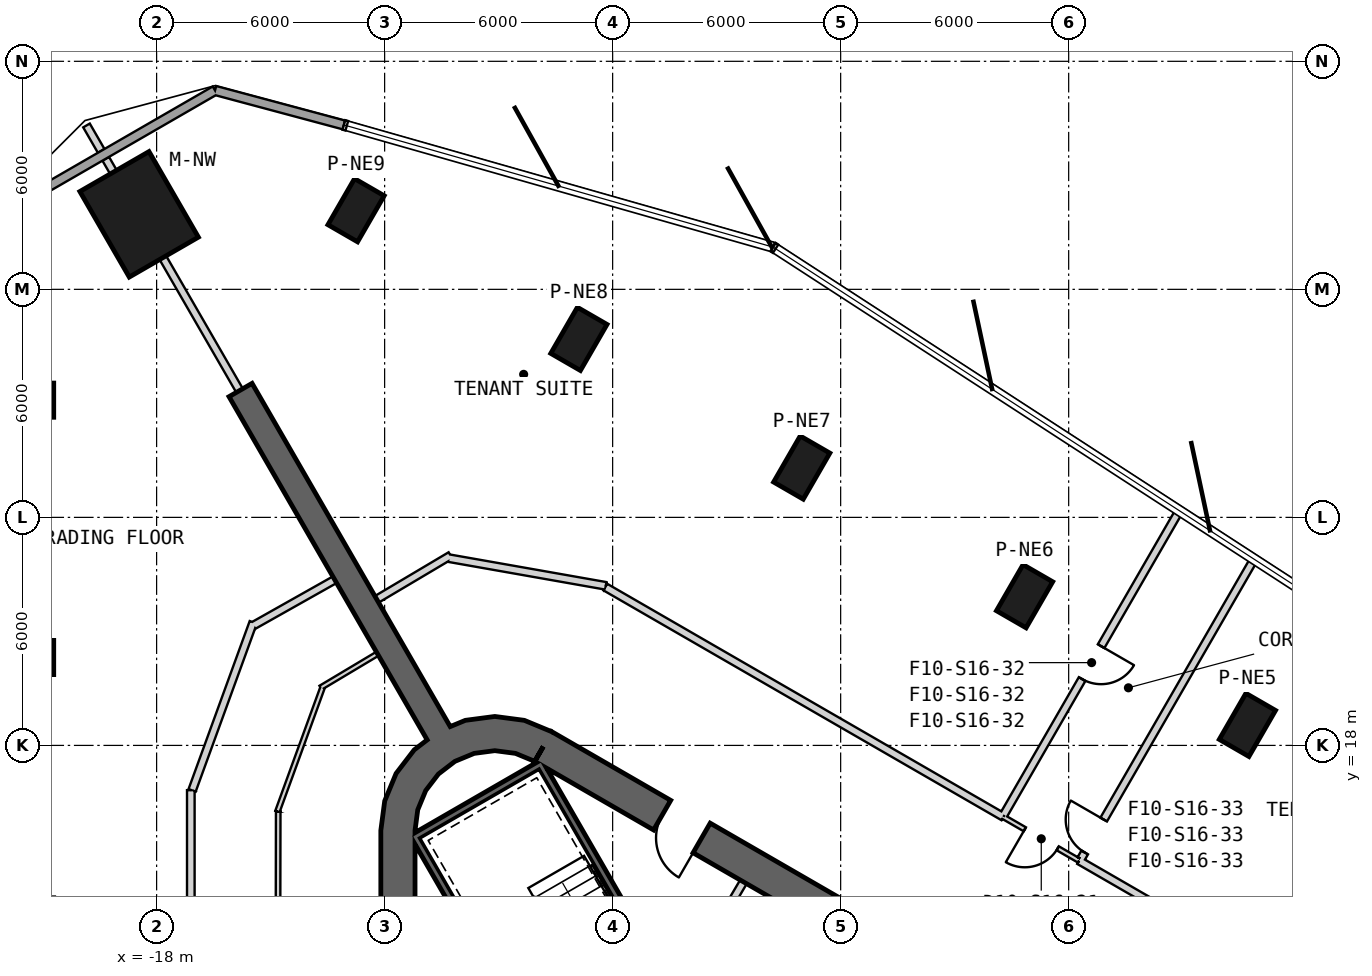
"""IFC4 building model, lengths in metres.
Left out: names, types, materials, properties, quantities, classifications, styles, units other than length and angle.
Written with IfcOpenShell. Run it as: python <this file> out.ifc"""

import sys

from ifc_helpers import new_model, si_unit, direction, frame, frame_2d, origin, origin_2d, place, context, subcontext, project, spatial, polyline, rectangle, outline, extrude, element, fill, save


model = new_model("IFC4")
c1 = context("Model", 3, precision=1e-05, world=origin(), true_north=direction((0.0, 1.0)))
c2 = subcontext(c1, "Body", "Model", "MODEL_VIEW")
j1 = project(units=[si_unit("LENGTHUNIT", "METRE"), si_unit("PLANEANGLEUNIT", "RADIAN")], contexts=[c1])
p1 = place(None, origin())
s1 = spatial("IfcSite", under=j1, at=p1, CompositionType="ELEMENT")
p2 = place(p1, origin())
s2 = spatial("IfcBuilding", under=s1, at=p2, CompositionType="ELEMENT")
p3 = place(p2, frame((0.0, 0.0, 253.2)))
s3 = spatial("IfcBuildingStorey", under=s2, at=p3, CompositionType="ELEMENT", Elevation=253.2)
p4 = place(p3, frame((-18.46, 31.974, 0.0), z_axis=(0.0, 0.0, 1.0), x_axis=(-0.5, 0.866025403784, 0.0)))
e1 = element("IfcColumn", 1, at=p4, inside=s3, PredefinedType="COLUMN", context=c2, shape_type="SweptSolid", body=[
    extrude(rectangle(XDim=2.6, YDim=2.1, at=origin_2d()), origin(), (0.0, 0.0, 1.0), 4.0),
])
for number, where, z_axis, x_axis in (
    (2, (-21.407, 27.084, 0.0), (0.0, 0.0, 1.0), (-1.0, 0.0, 0.0)),
    (3, (-21.407, 20.313, 0.0), (0.0, 0.0, 1.0), (-1.0, 0.0, 0.0)),
    (4, (10.704, 18.539, 0.0), (0.0, 0.0, 1.0), (0.5, 0.866, 0.0)),
    (5, (4.84, 21.925, 0.0), (0.0, 0.0, 1.0), (0.5, 0.866, 0.0)),
    (6, (-1.024, 25.31, 0.0), (0.0, 0.0, 1.0), (0.5, 0.866, 0.0)),
    (7, (-6.888, 28.696, 0.0), (0.0, 0.0, 1.0), (0.5, 0.866, 0.0)),
    (8, (-12.752, 32.081, 0.0), (0.0, 0.0, 1.0), (0.5, 0.866, 0.0)),
):
    element("IfcColumn", number, at=place(p3, frame(where, z_axis=z_axis, x_axis=x_axis)), inside=s3, PredefinedType="COLUMN", context=c2, shape_type="SweptSolid", body=[
        extrude(rectangle(XDim=1.4, YDim=0.9, at=origin_2d()), origin(), (0.0, 0.0, 1.0), 4.0),
    ])
p5 = place(p3, frame((19.475, 2.208, 0.0), z_axis=(0.0, 0.0, 1.0), x_axis=(-0.866028369851, 0.499994862586, 0.0)))
e9 = element("IfcWall", 9, at=p5, inside=s3, PredefinedType="SHEAR", context=c2, shape_type="SweptSolid", body=[
    extrude(rectangle(XDim=31.523, YDim=0.9, at=frame_2d((15.762, 0.0))), origin(), (0.0, 0.0, 1.0), 4.0),
])
p6 = place(p5, frame((7.062, 0.0, 0.0)))
e10 = element("IfcOpeningElement", 10, at=p6, cuts=e9, PredefinedType="OPENING", context=c2, shape_type="SweptSolid", body=[
    extrude(rectangle(XDim=1.2, YDim=2.4, at=frame_2d((0.6, 1.2))), frame((0.0, 0.46, 0.0), z_axis=(0.0, -1.0, 0.0), x_axis=(1.0, 0.0, 0.0)), (0.0, 0.0, 1.0), 0.92),
])
p7 = place(p5, frame((3.612, 0.0, 0.0)))
e11 = element("IfcOpeningElement", 11, at=p7, cuts=e9, PredefinedType="OPENING", context=c2, shape_type="SweptSolid", body=[
    extrude(rectangle(XDim=1.2, YDim=2.4, at=frame_2d((0.6, 1.2))), frame((0.0, 0.46, 0.0), z_axis=(0.0, -1.0, 0.0), x_axis=(1.0, 0.0, 0.0)), (0.0, 0.0, 1.0), 0.92),
])
p8 = place(p5, frame((26.712, 0.0, 0.0)))
e12 = element("IfcOpeningElement", 12, at=p8, cuts=e9, PredefinedType="OPENING", context=c2, shape_type="SweptSolid", body=[
    extrude(rectangle(XDim=1.2, YDim=2.4, at=frame_2d((0.6, 1.2))), frame((0.0, 0.46, 0.0), z_axis=(0.0, -1.0, 0.0), x_axis=(1.0, 0.0, 0.0)), (0.0, 0.0, 1.0), 0.92),
])
p9 = place(p3, frame((-11.65, 15.762, 0.0), z_axis=(0.0, 0.0, 1.0), x_axis=(0.0, -1.0, 0.0)))
e13 = element("IfcWall", 13, at=p9, inside=s3, PredefinedType="SHEAR", context=c2, shape_type="SweptSolid", body=[
    extrude(rectangle(XDim=31.523, YDim=0.9, at=frame_2d((15.762, 0.0))), origin(), (0.0, 0.0, 1.0), 4.0),
])
p10 = place(p9, frame((7.062, 0.0, 0.0)))
e14 = element("IfcOpeningElement", 14, at=p10, cuts=e13, PredefinedType="OPENING", context=c2, shape_type="SweptSolid", body=[
    extrude(rectangle(XDim=1.2, YDim=2.4, at=frame_2d((0.6, 1.2))), frame((0.0, 0.46, 0.0), z_axis=(0.0, -1.0, 0.0), x_axis=(1.0, 0.0, 0.0)), (0.0, 0.0, 1.0), 0.92),
])
p11 = place(p9, frame((9.762, 0.0, 0.0)))
e15 = element("IfcOpeningElement", 15, at=p11, cuts=e13, PredefinedType="OPENING", context=c2, shape_type="SweptSolid", body=[
    extrude(rectangle(XDim=1.2, YDim=2.4, at=frame_2d((0.6, 1.2))), frame((0.0, 0.46, 0.0), z_axis=(0.0, -1.0, 0.0), x_axis=(1.0, 0.0, 0.0)), (0.0, 0.0, 1.0), 0.92),
])
p12 = place(p9, frame((12.462, 0.0, 0.0)))
e16 = element("IfcOpeningElement", 16, at=p12, cuts=e13, PredefinedType="OPENING", context=c2, shape_type="SweptSolid", body=[
    extrude(rectangle(XDim=1.2, YDim=2.4, at=frame_2d((0.6, 1.2))), frame((0.0, 0.46, 0.0), z_axis=(0.0, -1.0, 0.0), x_axis=(1.0, 0.0, 0.0)), (0.0, 0.0, 1.0), 0.92),
])
p13 = place(p9, frame((15.162, 0.0, 0.0)))
e17 = element("IfcOpeningElement", 17, at=p13, cuts=e13, PredefinedType="OPENING", context=c2, shape_type="SweptSolid", body=[
    extrude(rectangle(XDim=1.2, YDim=2.4, at=frame_2d((0.6, 1.2))), frame((0.0, 0.46, 0.0), z_axis=(0.0, -1.0, 0.0), x_axis=(1.0, 0.0, 0.0)), (0.0, 0.0, 1.0), 0.92),
])
p14 = place(p9, frame((17.862, 0.0, 0.0)))
e18 = element("IfcOpeningElement", 18, at=p14, cuts=e13, PredefinedType="OPENING", context=c2, shape_type="SweptSolid", body=[
    extrude(rectangle(XDim=1.2, YDim=2.4, at=frame_2d((0.6, 1.2))), frame((0.0, 0.46, 0.0), z_axis=(0.0, -1.0, 0.0), x_axis=(1.0, 0.0, 0.0)), (0.0, 0.0, 1.0), 0.92),
])
p15 = place(p9, frame((20.562, 0.0, 0.0)))
e19 = element("IfcOpeningElement", 19, at=p15, cuts=e13, PredefinedType="OPENING", context=c2, shape_type="SweptSolid", body=[
    extrude(rectangle(XDim=1.2, YDim=2.4, at=frame_2d((0.6, 1.2))), frame((0.0, 0.46, 0.0), z_axis=(0.0, -1.0, 0.0), x_axis=(1.0, 0.0, 0.0)), (0.0, 0.0, 1.0), 0.92),
])
p16 = place(p9, frame((23.262, 0.0, 0.0)))
e20 = element("IfcOpeningElement", 20, at=p16, cuts=e13, PredefinedType="OPENING", context=c2, shape_type="SweptSolid", body=[
    extrude(rectangle(XDim=1.2, YDim=2.4, at=frame_2d((0.6, 1.2))), frame((0.0, 0.46, 0.0), z_axis=(0.0, -1.0, 0.0), x_axis=(1.0, 0.0, 0.0)), (0.0, 0.0, 1.0), 0.92),
])
p17 = place(p9, frame((3.612, 0.0, 0.0)))
e21 = element("IfcOpeningElement", 21, at=p17, cuts=e13, PredefinedType="OPENING", context=c2, shape_type="SweptSolid", body=[
    extrude(rectangle(XDim=1.2, YDim=2.4, at=frame_2d((0.6, 1.2))), frame((0.0, 0.46, 0.0), z_axis=(0.0, -1.0, 0.0), x_axis=(1.0, 0.0, 0.0)), (0.0, 0.0, 1.0), 0.92),
])
p18 = place(p9, frame((26.712, 0.0, 0.0)))
e22 = element("IfcOpeningElement", 22, at=p18, cuts=e13, PredefinedType="OPENING", context=c2, shape_type="SweptSolid", body=[
    extrude(rectangle(XDim=1.2, YDim=2.4, at=frame_2d((0.6, 1.2))), frame((0.0, 0.46, 0.0), z_axis=(0.0, -1.0, 0.0), x_axis=(1.0, 0.0, 0.0)), (0.0, 0.0, 1.0), 0.92),
])
p19 = place(p3, origin())
e23 = element("IfcWall", 23, at=p19, inside=s3, PredefinedType="SHEAR", context=c2, shape_type="SweptSolid", body=[
    extrude(outline(polyline([(-7.6, 18.36), (-8.323, 18.659), (-9.1, 18.762), (-9.876, 18.659), (-10.6, 18.36), (-11.221, 17.883), (-11.698, 17.262), (-11.998, 16.538), (-12.1, 15.762), (-11.2, 15.762), (-11.128, 16.305), (-10.919, 16.812), (-10.585, 17.247), (-10.15, 17.58), (-9.644, 17.79), (-9.1, 17.862), (-8.556, 17.79), (-8.05, 17.58), (-7.6, 18.36)])), origin(), (0.0, 0.0, 1.0), 4.0),
])
p20 = place(p3, frame((-10.575, 18.316, 0.0), z_axis=(0.0, 0.0, 1.0), x_axis=(-0.500010108608, 0.866019567498, 0.0)))
e24 = element("IfcWall", 24, at=p20, inside=s3, PredefinedType="SHEAR", context=c2, shape_type="SweptSolid", body=[
    extrude(rectangle(XDim=10.432, YDim=0.7, at=frame_2d((5.216, 0.0))), origin(), (0.0, 0.0, 1.0), 4.0),
])
p21 = place(p3, frame((-13.072, 34.326, 0.0), z_axis=(0.0, 0.0, 1.0), x_axis=(-0.965926007748, 0.258818367886, 0.0)))
e25 = element("IfcWall", 25, at=p21, inside=s3, PredefinedType="SOLIDWALL", context=c2, shape_type="SweptSolid", body=[
    extrude(rectangle(XDim=3.51, YDim=0.24, at=frame_2d((1.755, 0.0))), origin(), (0.0, 0.0, 1.0), 3.7),
])
p22 = place(p3, frame((-16.463, 35.235, 0.0), z_axis=(0.0, 0.0, 1.0), x_axis=(-0.86603253074, -0.499987655547, 0.0)))
e26 = element("IfcWall", 26, at=p22, inside=s3, PredefinedType="SOLIDWALL", context=c2, shape_type="SweptSolid", body=[
    extrude(rectangle(XDim=6.72, YDim=0.24, at=frame_2d((3.36, 0.0))), origin(), (0.0, 0.0, 1.0), 3.7),
])
p23 = place(p3, frame((-11.245, 15.678, -0.3), z_axis=(0.0, 0.0, 1.0), x_axis=(0.499977274689, -0.866038523851, 0.0)))
e27 = element("IfcWall", 27, at=p23, inside=s3, PredefinedType="SHEAR", context=c2, shape_type="SweptSolid", body=[
    extrude(rectangle(XDim=8.1, YDim=0.2, at=frame_2d((4.05, 0.0))), origin(), (0.0, 0.0, 1.0), 4.0),
])
p24 = place(p3, frame((-7.818, 17.541, -0.3), z_axis=(0.0, 0.0, 1.0), x_axis=(-0.866044365799, -0.499967155389, 0.0)))
e28 = element("IfcWall", 28, at=p24, inside=s3, PredefinedType="SHEAR", context=c2, shape_type="SweptSolid", body=[
    extrude(rectangle(XDim=3.8, YDim=0.2, at=frame_2d((1.9, 0.0))), origin(), (0.0, 0.0, 1.0), 4.0),
])
p25 = place(p3, frame((-7.854, 17.405, -0.3), z_axis=(0.0, 0.0, 1.0), x_axis=(0.499997992926, -0.866026562566, 0.0)))
e29 = element("IfcWall", 29, at=p25, inside=s3, PredefinedType="SHEAR", context=c2, shape_type="SweptSolid", body=[
    extrude(rectangle(XDim=7.9, YDim=0.2, at=frame_2d((3.95, 0.0))), origin(), (0.0, 0.0, 1.0), 4.0),
])
p26 = place(p3, frame((-2.558, 14.409, 0.0), z_axis=(0.0, 0.0, 1.0), x_axis=(-0.508018930956, -0.861345903683, 0.0)))
e30 = element("IfcWall", 30, at=p26, inside=s3, PredefinedType="PARTITIONING", context=c2, shape_type="SweptSolid", body=[
    extrude(rectangle(XDim=3.15, YDim=0.2, at=frame_2d((1.575, 0.0))), origin(), (0.0, 0.0, 1.0), 3.7),
])
p27 = place(p26, frame((1.175, 0.0, 0.0)))
e31 = element("IfcOpeningElement", 31, at=p27, cuts=e30, PredefinedType="OPENING", context=c2, shape_type="SweptSolid", body=[
    extrude(rectangle(XDim=0.8, YDim=2.1, at=frame_2d((0.4, 1.05))), frame((0.0, 0.11, 0.0), z_axis=(0.0, -1.0, 0.0), x_axis=(1.0, 0.0, 0.0)), (0.0, 0.0, 1.0), 0.22),
])
p28 = place(p3, frame((-12.189, 20.411, 0.0), z_axis=(0.0, 0.0, 1.0), x_axis=(-0.858492721014, -0.51282574815, 0.0)))
e32 = element("IfcWall", 32, at=p28, inside=s3, PredefinedType="PARTITIONING", context=c2, shape_type="SweptSolid", body=[
    extrude(rectangle(XDim=1.742, YDim=0.12, at=frame_2d((0.871, 0.0))), origin(), (0.0, 0.0, 1.0), 3.7),
])
p29 = place(p3, frame((-13.631, 19.53, 0.0), z_axis=(0.0, 0.0, 1.0), x_axis=(-0.342069878069, -0.939674517329, 0.0)))
e33 = element("IfcWall", 33, at=p29, inside=s3, PredefinedType="PARTITIONING", context=c2, shape_type="SweptSolid", body=[
    extrude(rectangle(XDim=3.479, YDim=0.12, at=frame_2d((1.739, 0.0))), origin(), (0.0, 0.0, 1.0), 2.88),
])
p30 = place(p3, frame((-14.8, 16.257, 0.0), z_axis=(0.0, 0.0, 1.0), x_axis=(-0.001847148781, -0.999998294019, 0.0)))
e34 = element("IfcWall", 34, at=p30, inside=s3, PredefinedType="PARTITIONING", context=c2, shape_type="SweptSolid", body=[
    extrude(rectangle(XDim=16.257, YDim=0.12, at=frame_2d((8.128, 0.0))), origin(), (0.0, 0.0, 1.0), 2.98),
])
p31 = place(p30, frame((7.629, 0.0, 0.0)))
e35 = element("IfcOpeningElement", 35, at=p31, cuts=e34, PredefinedType="OPENING", context=c2, shape_type="SweptSolid", body=[
    extrude(rectangle(XDim=1.0, YDim=2.1, at=frame_2d((0.5, 1.05))), frame((0.0, 0.07, 0.0), z_axis=(0.0, -1.0, 0.0), x_axis=(1.0, 0.0, 0.0)), (0.0, 0.0, 1.0), 0.14),
])
p32 = place(p3, frame((-17.1, 16.823, 0.0), z_axis=(0.0, 0.0, 1.0), x_axis=(0.0, -1.0, 0.0)))
e36 = element("IfcWall", 36, at=p32, inside=s3, PredefinedType="PARTITIONING", context=c2, shape_type="SweptSolid", body=[
    extrude(rectangle(XDim=12.473, YDim=0.2, at=frame_2d((6.236, 0.0))), origin(), (0.0, 0.0, 1.0), 2.98),
])
p33 = place(p32, frame((5.776, 0.0, 0.0)))
e37 = element("IfcOpeningElement", 37, at=p33, cuts=e36, PredefinedType="OPENING", context=c2, shape_type="SweptSolid", body=[
    extrude(rectangle(XDim=1.0, YDim=2.1, at=frame_2d((0.5, 1.05))), frame((0.0, 0.11, 0.0), z_axis=(0.0, -1.0, 0.0), x_axis=(1.0, 0.0, 0.0)), (0.0, 0.0, 1.0), 0.22),
])
p34 = place(p3, frame((-15.456, 21.239, 0.0), z_axis=(0.0, 0.0, 1.0), x_axis=(-0.34205546997, -0.939679762187, 0.0)))
e38 = element("IfcWall", 38, at=p34, inside=s3, PredefinedType="PARTITIONING", context=c2, shape_type="SweptSolid", body=[
    extrude(rectangle(XDim=4.706, YDim=0.2, at=frame_2d((2.353, 0.0))), origin(), (0.0, 0.0, 1.0), 2.88),
])
p35 = place(p3, frame((-13.313, 22.359, 0.0), z_axis=(0.0, 0.0, 1.0), x_axis=(-0.87121710687, -0.490897904555, 0.0)))
e39 = element("IfcWall", 39, at=p35, inside=s3, PredefinedType="PARTITIONING", context=c2, shape_type="SweptSolid", body=[
    extrude(rectangle(XDim=2.457, YDim=0.2, at=frame_2d((1.229, 0.0))), origin(), (0.0, 0.0, 1.0), 3.7),
])
p36 = place(p3, frame((6.275, 14.968, 0.0), z_axis=(0.0, 0.0, 1.0), x_axis=(-0.866053019151, 0.499952165731, 0.0)))
e40 = element("IfcWall", 40, at=p36, inside=s3, PredefinedType="PARTITIONING", context=c2, shape_type="SweptSolid", body=[
    extrude(rectangle(XDim=2.3, YDim=0.12, at=frame_2d((1.15, 0.0))), origin(), (0.0, 0.0, 1.0), 3.7),
])
p37 = place(p36, frame((0.65, 0.0, 0.0)))
e41 = element("IfcOpeningElement", 41, at=p37, cuts=e40, PredefinedType="OPENING", context=c2, shape_type="SweptSolid", body=[
    extrude(rectangle(XDim=1.0, YDim=2.1, at=frame_2d((0.5, 1.05))), frame((0.0, 0.07, 0.0), z_axis=(0.0, -1.0, 0.0), x_axis=(1.0, 0.0, 0.0)), (0.0, 0.0, 1.0), 0.14),
])
p38 = place(p3, frame((-10.265, 22.996, 0.0), z_axis=(0.0, 0.0, 1.0), x_axis=(-0.859934823121, -0.510403859687, 0.0)))
e42 = element("IfcWall", 42, at=p38, inside=s3, PredefinedType="PARTITIONING", context=c2, shape_type="SweptSolid", body=[
    extrude(rectangle(XDim=2.258, YDim=0.2, at=frame_2d((1.129, 0.0))), origin(), (0.0, 0.0, 1.0), 3.7),
])
p39 = place(p3, frame((-6.181, 22.199, 0.0), z_axis=(0.0, 0.0, 1.0), x_axis=(-0.984807544765, 0.17364935869, 0.0)))
e43 = element("IfcWall", 43, at=p39, inside=s3, PredefinedType="PARTITIONING", context=c2, shape_type="SweptSolid", body=[
    extrude(rectangle(XDim=4.199, YDim=0.2, at=frame_2d((2.1, 0.0))), origin(), (0.0, 0.0, 1.0), 2.88),
])
p40 = place(p3, frame((16.823, 8.878, 0.0), z_axis=(0.0, 0.0, 1.0), x_axis=(-0.866020355572, 0.500008743658, 0.0)))
e44 = element("IfcWall", 44, at=p40, inside=s3, PredefinedType="PARTITIONING", context=c2, shape_type="SweptSolid", body=[
    extrude(rectangle(XDim=12.18, YDim=0.2, at=frame_2d((6.09, 0.0))), origin(), (0.0, 0.0, 1.0), 2.98),
])
p41 = place(p3, frame((4.283, 16.118, 0.0), z_axis=(0.0, 0.0, 1.0), x_axis=(-0.866016186489, 0.500015964484, 0.0)))
e45 = element("IfcWall", 45, at=p41, inside=s3, PredefinedType="PARTITIONING", context=c2, shape_type="SweptSolid", body=[
    extrude(rectangle(XDim=12.096, YDim=0.2, at=frame_2d((6.048, 0.0))), origin(), (0.0, 0.0, 1.0), 2.98),
])
p42 = place(p3, frame((-19.845, 34.312, 0.0), z_axis=(0.0, 0.0, 1.0), x_axis=(0.500151178888, -0.865938103017, 0.0)))
e46 = element("IfcWall", 46, at=p42, inside=s3, PredefinedType="PARTITIONING", context=c2, shape_type="SweptSolid", body=[
    extrude(rectangle(XDim=0.772, YDim=0.2, at=frame_2d((0.386, 0.0))), origin(), (0.0, 0.0, 1.0), 3.7),
])
p43 = place(p3, frame((-19.339, 33.436, 0.0), z_axis=(0.0, 0.0, 1.0), x_axis=(0.499896243657, -0.866085299251, 0.0)))
e47 = element("IfcWall", 47, at=p43, inside=s3, PredefinedType="PARTITIONING", context=c2, shape_type="SweptSolid", body=[
    extrude(rectangle(XDim=0.405, YDim=0.2, at=frame_2d((0.203, 0.0))), origin(), (0.0, 0.0, 1.0), 3.7),
])
p44 = place(p3, frame((-17.836, 30.833, 0.0), z_axis=(0.0, 0.0, 1.0), x_axis=(0.500008591458, -0.866020443447, 0.0)))
e48 = element("IfcWall", 48, at=p44, inside=s3, PredefinedType="PARTITIONING", context=c2, shape_type="SweptSolid", body=[
    extrude(rectangle(XDim=4.038, YDim=0.2, at=frame_2d((2.019, 0.0))), origin(), (0.0, 0.0, 1.0), 3.27),
])
p45 = place(p3, frame((8.912, 24.176, 0.0), z_axis=(0.0, 0.0, 1.0), x_axis=(-0.500000924775, -0.866024869865, 0.0)))
e49 = element("IfcWall", 49, at=p45, inside=s3, PredefinedType="PARTITIONING", context=c2, shape_type="SweptSolid", body=[
    extrude(rectangle(XDim=9.233, YDim=0.2, at=frame_2d((4.617, 0.0))), origin(), (0.0, 0.0, 1.0), 3.7),
])
p46 = place(p45, frame((4.117, 0.0, 0.0)))
e50 = element("IfcOpeningElement", 50, at=p46, cuts=e49, PredefinedType="OPENING", context=c2, shape_type="SweptSolid", body=[
    extrude(rectangle(XDim=1.0, YDim=2.1, at=frame_2d((0.5, 1.05))), frame((0.0, 0.11, 0.0), z_axis=(0.0, -1.0, 0.0), x_axis=(1.0, 0.0, 0.0)), (0.0, 0.0, 1.0), 0.22),
])
p47 = place(p3, frame((6.322, 15.01, 0.0), z_axis=(0.0, 0.0, 1.0), x_axis=(0.500009283198, 0.866020044061, 0.0)))
e51 = element("IfcWall", 51, at=p47, inside=s3, PredefinedType="PARTITIONING", context=c2, shape_type="SweptSolid", body=[
    extrude(rectangle(XDim=9.112, YDim=0.2, at=frame_2d((4.556, 0.0))), origin(), (0.0, 0.0, 1.0), 3.7),
])
p48 = place(p47, frame((0.2, 0.0, 0.0)))
e52 = element("IfcOpeningElement", 52, at=p48, cuts=e51, PredefinedType="OPENING", context=c2, shape_type="SweptSolid", body=[
    extrude(rectangle(XDim=1.0, YDim=2.1, at=frame_2d((0.5, 1.05))), frame((0.0, 0.11, 0.0), z_axis=(0.0, -1.0, 0.0), x_axis=(1.0, 0.0, 0.0)), (0.0, 0.0, 1.0), 0.22),
])
p49 = place(p37, origin())
e53 = element("IfcDoor", 53, at=p49, inside=s3, OperationType="SINGLE_SWING_RIGHT", PredefinedType="NOTDEFINED", context=c2, shape_type="SweptSolid", body=[
    extrude(rectangle(XDim=1.0, YDim=2.1, at=frame_2d((0.5, 1.05))), frame((0.0, 0.025, 0.0), z_axis=(0.0, -1.0, 0.0), x_axis=(1.0, 0.0, 0.0)), (0.0, 0.0, 1.0), 0.05),
])
fill(e41, e53)
p50 = place(p46, origin())
e54 = element("IfcDoor", 54, at=p50, inside=s3, OperationType="SINGLE_SWING_RIGHT", PredefinedType="USERDEFINED", context=c2, shape_type="SweptSolid", body=[
    extrude(rectangle(XDim=1.0, YDim=2.1, at=frame_2d((0.5, 1.05))), frame((0.0, 0.025, 0.0), z_axis=(0.0, -1.0, 0.0), x_axis=(1.0, 0.0, 0.0)), (0.0, 0.0, 1.0), 0.05),
])
fill(e50, e54)
p51 = place(p48, origin())
e55 = element("IfcDoor", 55, at=p51, inside=s3, OperationType="SINGLE_SWING_LEFT", PredefinedType="USERDEFINED", context=c2, shape_type="SweptSolid", body=[
    extrude(rectangle(XDim=1.0, YDim=2.1, at=frame_2d((0.5, 1.05))), frame((0.0, 0.025, 0.0), z_axis=(0.0, -1.0, 0.0), x_axis=(1.0, 0.0, 0.0)), (0.0, 0.0, 1.0), 0.05),
])
fill(e52, e55)
p52 = place(p8, origin())
e56 = element("IfcDoor", 56, at=p52, inside=s3, OperationType="SINGLE_SWING_RIGHT", PredefinedType="USERDEFINED", context=c2, shape_type="SweptSolid", body=[
    extrude(rectangle(XDim=1.2, YDim=2.4, at=frame_2d((0.6, 1.2))), frame((0.0, 0.025, 0.0), z_axis=(0.0, -1.0, 0.0), x_axis=(1.0, 0.0, 0.0)), (0.0, 0.0, 1.0), 0.05),
])
fill(e12, e56)
save(model, sys.argv[1])
